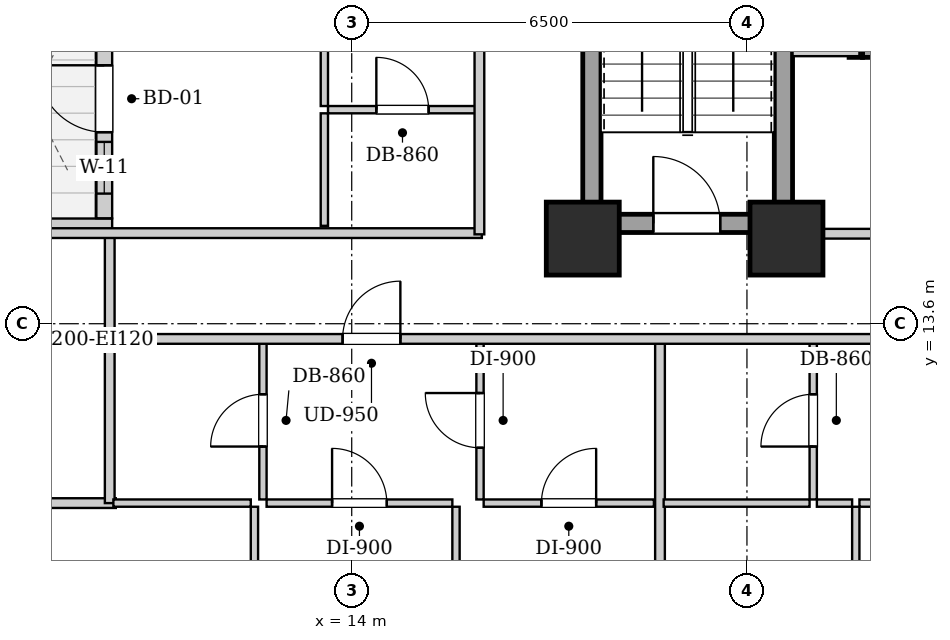
"""IFC4 building model, lengths in metres.
Left out: names, types, materials, properties, quantities, classifications, styles, units other than length and angle.
Written with IfcOpenShell. Run it as: python <this file> out.ifc"""

import sys

from ifc_helpers import new_model, si_unit, direction, frame, frame_2d, origin, origin_2d, place, context, subcontext, project, spatial, rectangle, extrude, element, fill, save


model = new_model("IFC4")
c1 = context("Model", 3, precision=1e-05, world=origin(), true_north=direction((0.0, 1.0)))
c2 = subcontext(c1, "Body", "Model", "MODEL_VIEW")
j1 = project(units=[si_unit("LENGTHUNIT", "METRE"), si_unit("PLANEANGLEUNIT", "RADIAN")], contexts=[c1])
p1 = place(None, origin())
s1 = spatial("IfcSite", under=j1, at=p1, CompositionType="ELEMENT")
p2 = place(p1, origin())
s2 = spatial("IfcBuilding", under=s1, at=p2, CompositionType="ELEMENT")
p3 = place(p2, frame((0.0, 0.0, 41.8)))
s3 = spatial("IfcBuildingStorey", under=s2, at=p3, CompositionType="ELEMENT", Elevation=41.8)
for number, where, z_axis, x_axis in (
    (1, (17.8, 15.0, 0.0), (0.0, 0.0, 1.0), (1.0, 0.0, 0.0)),
    (2, (21.15, 15.0, 0.0), (0.0, 0.0, 1.0), (1.0, 0.0, 0.0)),
):
    element("IfcColumn", number, at=place(p3, frame(where, z_axis=z_axis, x_axis=x_axis)), inside=s3, PredefinedType="COLUMN", context=c2, shape_type="SweptSolid", body=[
        extrude(rectangle(XDim=1.2, YDim=1.2, at=origin_2d()), origin(), (0.0, 0.0, 1.0), 3.2),
    ])
p4 = place(p3, frame((7.66, 15.2, 0.0), z_axis=(0.0, 0.0, 1.0), x_axis=(1.0, 0.0, 0.0)))
e3 = element("IfcWall", 3, at=p4, inside=s3, PredefinedType="SOLIDWALL", context=c2, shape_type="SweptSolid", body=[
    extrude(rectangle(XDim=2.4, YDim=0.26, at=frame_2d((1.2, 0.0))), origin(), (0.0, 0.0, 1.0), 2.94),
])
p5 = place(p3, frame((9.93, 15.334, 0.0), z_axis=(0.0, 0.0, 1.0), x_axis=(0.0, 1.0, 0.0)))
e4 = element("IfcWall", 4, at=p5, inside=s3, PredefinedType="SOLIDWALL", context=c2, shape_type="SweptSolid", body=[
    extrude(rectangle(XDim=3.932, YDim=0.26, at=frame_2d((1.966, 0.0))), origin(), (0.0, 0.0, 1.0), 2.94),
])
p6 = place(p5, frame((1.416, 0.0, 0.0)))
e5 = element("IfcOpeningElement", 5, at=p6, cuts=e4, PredefinedType="OPENING", context=c2, shape_type="SweptSolid", body=[
    extrude(rectangle(XDim=1.1, YDim=2.0, at=frame_2d((0.55, 1.0))), frame((0.0, 0.14, 0.0), z_axis=(0.0, -1.0, 0.0), x_axis=(1.0, 0.0, 0.0)), (0.0, 0.0, 1.0), 0.28),
])
p7 = place(p5, frame((0.406, 0.0, 0.55)))
e6 = element("IfcOpeningElement", 6, at=p7, cuts=e4, PredefinedType="OPENING", context=c2, shape_type="SweptSolid", body=[
    extrude(rectangle(XDim=0.85, YDim=1.2, at=frame_2d((0.425, 0.6))), frame((0.0, 0.14, 0.0), z_axis=(0.0, -1.0, 0.0), x_axis=(1.0, 0.0, 0.0)), (0.0, 0.0, 1.0), 0.28),
])
for number, where, z_axis, x_axis in (
    (7, (17.95, 15.1, 0.0), (0.0, 0.0, 1.0), (0.0, 1.0, 0.0)),
    (8, (21.1, 15.1, 0.0), (0.0, 0.0, 1.0), (0.0, 1.0, 0.0)),
):
    element("IfcWall", number, at=place(p3, frame(where, z_axis=z_axis, x_axis=x_axis)), inside=s3, PredefinedType="SHEAR", context=c2, shape_type="SweptSolid", body=[
        extrude(rectangle(XDim=9.0, YDim=0.3, at=frame_2d((4.5, 0.0))), origin(), (0.0, 0.0, 1.0), 2.94),
    ])
p8 = place(p3, frame((18.1, 15.25, 0.0), z_axis=(0.0, 0.0, 1.0), x_axis=(1.0, 0.0, 0.0)))
e9 = element("IfcWall", 9, at=p8, inside=s3, PredefinedType="SHEAR", context=c2, shape_type="SweptSolid", body=[
    extrude(rectangle(XDim=2.85, YDim=0.3, at=frame_2d((1.425, 0.0))), origin(), (0.0, 0.0, 1.0), 2.94),
])
p9 = place(p8, frame((0.86, 0.0, 0.0)))
e10 = element("IfcOpeningElement", 10, at=p9, cuts=e9, PredefinedType="OPENING", context=c2, shape_type="SweptSolid", body=[
    extrude(rectangle(XDim=1.1, YDim=2.05, at=frame_2d((0.55, 1.025))), frame((0.0, 0.16, 0.0), z_axis=(0.0, -1.0, 0.0), x_axis=(1.0, 0.0, 0.0)), (0.0, 0.0, 1.0), 0.32),
])
p10 = place(p3, frame((22.4, 18.09, 0.0), z_axis=(0.0, 0.0, 1.0), x_axis=(1.0, 0.0, 0.0)))
e11 = element("IfcWall", 11, at=p10, inside=s3, PredefinedType="SHEAR", context=c2, shape_type="SweptSolid", body=[
    extrude(rectangle(XDim=2.4, YDim=0.22, at=frame_2d((1.2, 0.0))), origin(), (0.0, 0.0, 1.0), 2.94),
])
p11 = place(p10, frame((0.6, 0.0, 0.0)))
e12 = element("IfcOpeningElement", 12, at=p11, cuts=e11, PredefinedType="OPENING", context=c2, shape_type="SweptSolid", body=[
    extrude(rectangle(XDim=1.2, YDim=2.15, at=frame_2d((0.6, 1.075))), frame((0.0, 0.12, 0.0), z_axis=(0.0, -1.0, 0.0), x_axis=(1.0, 0.0, 0.0)), (0.0, 0.0, 1.0), 0.24),
])
p12 = place(p3, frame((22.29, 17.98, 0.0), z_axis=(0.0, 0.0, 1.0), x_axis=(0.0, 1.0, 0.0)))
e13 = element("IfcWall", 13, at=p12, inside=s3, PredefinedType="SHEAR", context=c2, shape_type="SweptSolid", body=[
    extrude(rectangle(XDim=2.54, YDim=0.22, at=frame_2d((1.27, 0.0))), origin(), (0.0, 0.0, 1.0), 2.94),
])
p13 = place(p3, frame((21.25, 15.08, 0.0), z_axis=(0.0, 0.0, 1.0), x_axis=(1.0, 0.0, 0.0)))
e14 = element("IfcWall", 14, at=p13, inside=s3, PredefinedType="PARTITIONING", context=c2, shape_type="SweptSolid", body=[
    extrude(rectangle(XDim=8.5, YDim=0.16, at=frame_2d((4.25, 0.0))), origin(), (0.0, 0.0, 1.0), 2.155),
])
p14 = place(p13, frame((3.725, 0.0, 0.0)))
e15 = element("IfcOpeningElement", 15, at=p14, cuts=e14, PredefinedType="OPENING", context=c2, shape_type="SweptSolid", body=[
    extrude(rectangle(XDim=1.05, YDim=2.05, at=frame_2d((0.525, 1.025))), frame((0.0, 0.09, 0.0), z_axis=(0.0, -1.0, 0.0), x_axis=(1.0, 0.0, 0.0)), (0.0, 0.0, 1.0), 0.18),
])
p15 = place(p3, frame((21.25, 18.08, 0.0), z_axis=(0.0, 0.0, 1.0), x_axis=(1.0, 0.0, 0.0)))
e16 = element("IfcWall", 16, at=p15, inside=s3, PredefinedType="PARTITIONING", context=c2, shape_type="SweptSolid", body=[
    extrude(rectangle(XDim=1.1, YDim=0.16, at=frame_2d((0.55, 0.0))), origin(), (0.0, 0.0, 1.0), 2.94),
])
p16 = place(p3, frame((10.02, 13.35, 0.0), z_axis=(0.0, 0.0, 1.0), x_axis=(0.0, 1.0, 0.0)))
e17 = element("IfcWall", 17, at=p16, inside=s3, PredefinedType="PARTITIONING", context=c2, shape_type="SweptSolid", body=[
    extrude(rectangle(XDim=1.74, YDim=0.16, at=frame_2d((0.87, 0.0))), origin(), (0.0, 0.0, 1.0), 2.94),
])
p17 = place(p3, frame((7.78, 15.09, 0.0), z_axis=(0.0, 0.0, 1.0), x_axis=(1.0, 0.0, 0.0)))
e18 = element("IfcWall", 18, at=p17, inside=s3, PredefinedType="PARTITIONING", context=c2, shape_type="SweptSolid", body=[
    extrude(rectangle(XDim=8.36, YDim=0.16, at=frame_2d((4.18, 0.0))), origin(), (0.0, 0.0, 1.0), 2.155),
])
p18 = place(p3, frame((7.78, 10.65, 0.0), z_axis=(0.0, 0.0, 1.0), x_axis=(1.0, 0.0, 0.0)))
e19 = element("IfcWall", 19, at=p18, inside=s3, PredefinedType="PARTITIONING", context=c2, shape_type="SweptSolid", body=[
    extrude(rectangle(XDim=2.34, YDim=0.16, at=frame_2d((1.17, 0.0))), origin(), (0.0, 0.0, 1.0), 2.94),
])
p19 = place(p3, frame((10.02, 10.65, 0.0), z_axis=(0.0, 0.0, 1.0), x_axis=(0.0, 1.0, 0.0)))
e20 = element("IfcWall", 20, at=p19, inside=s3, PredefinedType="PARTITIONING", context=c2, shape_type="SweptSolid", body=[
    extrude(rectangle(XDim=2.66, YDim=0.16, at=frame_2d((1.33, 0.0))), origin(), (0.0, 0.0, 1.0), 2.94),
])
p20 = place(p3, frame((12.54, 10.71, 0.0), z_axis=(0.0, 0.0, 1.0), x_axis=(0.0, 1.0, 0.0)))
e21 = element("IfcWall", 21, at=p20, inside=s3, PredefinedType="PARTITIONING", context=c2, shape_type="SweptSolid", body=[
    extrude(rectangle(XDim=2.6, YDim=0.12, at=frame_2d((1.3, 0.0))), origin(), (0.0, 0.0, 1.0), 2.94),
])
p21 = place(p20, frame((0.87, 0.0, 0.0)))
e22 = element("IfcOpeningElement", 22, at=p21, cuts=e21, PredefinedType="OPENING", context=c2, shape_type="SweptSolid", body=[
    extrude(rectangle(XDim=0.86, YDim=2.05, at=frame_2d((0.43, 1.025))), frame((0.0, 0.07, 0.0), z_axis=(0.0, -1.0, 0.0), x_axis=(1.0, 0.0, 0.0)), (0.0, 0.0, 1.0), 0.14),
])
p22 = place(p3, frame((10.08, 10.65, 0.0), z_axis=(0.0, 0.0, 1.0), x_axis=(1.0, 0.0, 0.0)))
e23 = element("IfcWall", 23, at=p22, inside=s3, PredefinedType="PARTITIONING", context=c2, shape_type="SweptSolid", body=[
    extrude(rectangle(XDim=2.26, YDim=0.12, at=frame_2d((1.13, 0.0))), origin(), (0.0, 0.0, 1.0), 2.94),
])
p23 = place(p3, frame((16.11, 10.71, 0.0), z_axis=(0.0, 0.0, 1.0), x_axis=(0.0, 1.0, 0.0)))
e24 = element("IfcWall", 24, at=p23, inside=s3, PredefinedType="PARTITIONING", context=c2, shape_type="SweptSolid", body=[
    extrude(rectangle(XDim=2.6, YDim=0.12, at=frame_2d((1.3, 0.0))), origin(), (0.0, 0.0, 1.0), 2.94),
])
p24 = place(p23, frame((0.85, 0.0, 0.0)))
e25 = element("IfcOpeningElement", 25, at=p24, cuts=e24, PredefinedType="OPENING", context=c2, shape_type="SweptSolid", body=[
    extrude(rectangle(XDim=0.9, YDim=2.05, at=frame_2d((0.45, 1.025))), frame((0.0, 0.07, 0.0), z_axis=(0.0, -1.0, 0.0), x_axis=(1.0, 0.0, 0.0)), (0.0, 0.0, 1.0), 0.14),
])
p25 = place(p3, frame((12.6, 10.65, 0.0), z_axis=(0.0, 0.0, 1.0), x_axis=(1.0, 0.0, 0.0)))
e26 = element("IfcWall", 26, at=p25, inside=s3, PredefinedType="PARTITIONING", context=c2, shape_type="SweptSolid", body=[
    extrude(rectangle(XDim=3.055, YDim=0.12, at=frame_2d((1.527, 0.0))), origin(), (0.0, 0.0, 1.0), 2.94),
])
p26 = place(p25, frame((1.077, 0.0, 0.0)))
e27 = element("IfcOpeningElement", 27, at=p26, cuts=e26, PredefinedType="OPENING", context=c2, shape_type="SweptSolid", body=[
    extrude(rectangle(XDim=0.9, YDim=2.05, at=frame_2d((0.45, 1.025))), frame((0.0, 0.07, 0.0), z_axis=(0.0, -1.0, 0.0), x_axis=(1.0, 0.0, 0.0)), (0.0, 0.0, 1.0), 0.14),
])
p27 = place(p3, frame((16.17, 10.65, 0.0), z_axis=(0.0, 0.0, 1.0), x_axis=(1.0, 0.0, 0.0)))
e28 = element("IfcWall", 28, at=p27, inside=s3, PredefinedType="PARTITIONING", context=c2, shape_type="SweptSolid", body=[
    extrude(rectangle(XDim=2.8, YDim=0.12, at=frame_2d((1.4, 0.0))), origin(), (0.0, 0.0, 1.0), 2.94),
])
p28 = place(p27, frame((0.95, 0.0, 0.0)))
e29 = element("IfcOpeningElement", 29, at=p28, cuts=e28, PredefinedType="OPENING", context=c2, shape_type="SweptSolid", body=[
    extrude(rectangle(XDim=0.9, YDim=2.05, at=frame_2d((0.45, 1.025))), frame((0.0, 0.07, 0.0), z_axis=(0.0, -1.0, 0.0), x_axis=(1.0, 0.0, 0.0)), (0.0, 0.0, 1.0), 0.14),
])
p29 = place(p3, frame((12.4, 2.43, 0.0), z_axis=(0.0, 0.0, 1.0), x_axis=(0.0, 1.0, 0.0)))
e30 = element("IfcWall", 30, at=p29, inside=s3, PredefinedType="PARTITIONING", context=c2, shape_type="SweptSolid", body=[
    extrude(rectangle(XDim=8.16, YDim=0.12, at=frame_2d((4.08, 0.0))), origin(), (0.0, 0.0, 1.0), 2.94),
])
p30 = place(p29, frame((3.63, 0.0, 0.0)))
e31 = element("IfcOpeningElement", 31, at=p30, cuts=e30, PredefinedType="OPENING", context=c2, shape_type="SweptSolid", body=[
    extrude(rectangle(XDim=0.9, YDim=2.05, at=frame_2d((0.45, 1.025))), frame((0.0, 0.07, 0.0), z_axis=(0.0, -1.0, 0.0), x_axis=(1.0, 0.0, 0.0)), (0.0, 0.0, 1.0), 0.14),
])
p31 = place(p3, frame((15.715, 2.43, 0.0), z_axis=(0.0, 0.0, 1.0), x_axis=(0.0, 1.0, 0.0)))
e32 = element("IfcWall", 32, at=p31, inside=s3, PredefinedType="PARTITIONING", context=c2, shape_type="SweptSolid", body=[
    extrude(rectangle(XDim=8.16, YDim=0.12, at=frame_2d((4.08, 0.0))), origin(), (0.0, 0.0, 1.0), 2.94),
])
p32 = place(p31, frame((3.63, 0.0, 0.0)))
e33 = element("IfcOpeningElement", 33, at=p32, cuts=e32, PredefinedType="OPENING", context=c2, shape_type="SweptSolid", body=[
    extrude(rectangle(XDim=0.9, YDim=2.05, at=frame_2d((0.45, 1.025))), frame((0.0, 0.07, 0.0), z_axis=(0.0, -1.0, 0.0), x_axis=(1.0, 0.0, 0.0)), (0.0, 0.0, 1.0), 0.14),
])
p33 = place(p3, frame((19.07, 0.28, 0.0), z_axis=(0.0, 0.0, 1.0), x_axis=(0.0, 1.0, 0.0)))
e34 = element("IfcWall", 34, at=p33, inside=s3, PredefinedType="PARTITIONING", context=c2, shape_type="SweptSolid", body=[
    extrude(rectangle(XDim=13.03, YDim=0.16, at=frame_2d((6.515, 0.0))), origin(), (0.0, 0.0, 1.0), 2.94),
])
p34 = place(p3, frame((21.59, 10.71, 0.0), z_axis=(0.0, 0.0, 1.0), x_axis=(0.0, 1.0, 0.0)))
e35 = element("IfcWall", 35, at=p34, inside=s3, PredefinedType="PARTITIONING", context=c2, shape_type="SweptSolid", body=[
    extrude(rectangle(XDim=2.6, YDim=0.12, at=frame_2d((1.3, 0.0))), origin(), (0.0, 0.0, 1.0), 2.94),
])
p35 = place(p34, frame((0.87, 0.0, 0.0)))
e36 = element("IfcOpeningElement", 36, at=p35, cuts=e35, PredefinedType="OPENING", context=c2, shape_type="SweptSolid", body=[
    extrude(rectangle(XDim=0.86, YDim=2.05, at=frame_2d((0.43, 1.025))), frame((0.0, 0.07, 0.0), z_axis=(0.0, -1.0, 0.0), x_axis=(1.0, 0.0, 0.0)), (0.0, 0.0, 1.0), 0.14),
])
p36 = place(p3, frame((19.13, 10.65, 0.0), z_axis=(0.0, 0.0, 1.0), x_axis=(1.0, 0.0, 0.0)))
e37 = element("IfcWall", 37, at=p36, inside=s3, PredefinedType="PARTITIONING", context=c2, shape_type="SweptSolid", body=[
    extrude(rectangle(XDim=2.4, YDim=0.12, at=frame_2d((1.2, 0.0))), origin(), (0.0, 0.0, 1.0), 2.94),
])
p37 = place(p3, frame((21.65, 10.65, 0.0), z_axis=(0.0, 0.0, 1.0), x_axis=(1.0, 0.0, 0.0)))
e38 = element("IfcWall", 38, at=p37, inside=s3, PredefinedType="PARTITIONING", context=c2, shape_type="SweptSolid", body=[
    extrude(rectangle(XDim=0.58, YDim=0.12, at=frame_2d((0.29, 0.0))), origin(), (0.0, 0.0, 1.0), 2.94),
])
p38 = place(p3, frame((22.35, 10.65, 0.0), z_axis=(0.0, 0.0, 1.0), x_axis=(1.0, 0.0, 0.0)))
e39 = element("IfcWall", 39, at=p38, inside=s3, PredefinedType="PARTITIONING", context=c2, shape_type="SweptSolid", body=[
    extrude(rectangle(XDim=3.1, YDim=0.12, at=frame_2d((1.55, 0.0))), origin(), (0.0, 0.0, 1.0), 2.94),
])
p39 = place(p38, frame((1.1, 0.0, 0.0)))
e40 = element("IfcOpeningElement", 40, at=p39, cuts=e39, PredefinedType="OPENING", context=c2, shape_type="SweptSolid", body=[
    extrude(rectangle(XDim=0.9, YDim=2.05, at=frame_2d((0.45, 1.025))), frame((0.0, 0.07, 0.0), z_axis=(0.0, -1.0, 0.0), x_axis=(1.0, 0.0, 0.0)), (0.0, 0.0, 1.0), 0.14),
])
p40 = place(p3, frame((22.29, 0.28, 0.0), z_axis=(0.0, 0.0, 1.0), x_axis=(0.0, 1.0, 0.0)))
e41 = element("IfcWall", 41, at=p40, inside=s3, PredefinedType="PARTITIONING", context=c2, shape_type="SweptSolid", body=[
    extrude(rectangle(XDim=10.31, YDim=0.12, at=frame_2d((5.155, 0.0))), origin(), (0.0, 0.0, 1.0), 2.94),
])
p41 = place(p40, frame((4.69, 0.0, 0.0)))
e42 = element("IfcOpeningElement", 42, at=p41, cuts=e41, PredefinedType="OPENING", context=c2, shape_type="SweptSolid", body=[
    extrude(rectangle(XDim=0.9, YDim=2.05, at=frame_2d((0.45, 1.025))), frame((0.0, 0.07, 0.0), z_axis=(0.0, -1.0, 0.0), x_axis=(1.0, 0.0, 0.0)), (0.0, 0.0, 1.0), 0.14),
])
p42 = place(p3, frame((13.61, 17.12, 0.0), z_axis=(0.0, 0.0, 1.0), x_axis=(1.0, 0.0, 0.0)))
e43 = element("IfcWall", 43, at=p42, inside=s3, PredefinedType="PARTITIONING", context=c2, shape_type="SweptSolid", body=[
    extrude(rectangle(XDim=2.45, YDim=0.12, at=frame_2d((1.225, 0.0))), origin(), (0.0, 0.0, 1.0), 2.94),
])
p43 = place(p42, frame((0.795, 0.0, 0.0)))
e44 = element("IfcOpeningElement", 44, at=p43, cuts=e43, PredefinedType="OPENING", context=c2, shape_type="SweptSolid", body=[
    extrude(rectangle(XDim=0.86, YDim=2.05, at=frame_2d((0.43, 1.025))), frame((0.0, 0.07, 0.0), z_axis=(0.0, -1.0, 0.0), x_axis=(1.0, 0.0, 0.0)), (0.0, 0.0, 1.0), 0.14),
])
p44 = place(p3, frame((13.55, 15.21, 0.0), z_axis=(0.0, 0.0, 1.0), x_axis=(0.0, 1.0, 0.0)))
e45 = element("IfcWall", 45, at=p44, inside=s3, PredefinedType="PARTITIONING", context=c2, shape_type="SweptSolid", body=[
    extrude(rectangle(XDim=1.85, YDim=0.12, at=frame_2d((0.925, 0.0))), origin(), (0.0, 0.0, 1.0), 2.94),
])
p45 = place(p3, frame((13.55, 17.18, 0.0), z_axis=(0.0, 0.0, 1.0), x_axis=(0.0, 1.0, 0.0)))
e46 = element("IfcWall", 46, at=p45, inside=s3, PredefinedType="PARTITIONING", context=c2, shape_type="SweptSolid", body=[
    extrude(rectangle(XDim=3.946, YDim=0.12, at=frame_2d((1.973, 0.0))), origin(), (0.0, 0.0, 1.0), 2.94),
])
p46 = place(p45, frame((1.523, 0.0, 0.0)))
e47 = element("IfcOpeningElement", 47, at=p46, cuts=e46, PredefinedType="OPENING", context=c2, shape_type="SweptSolid", body=[
    extrude(rectangle(XDim=0.9, YDim=2.05, at=frame_2d((0.45, 1.025))), frame((0.0, 0.07, 0.0), z_axis=(0.0, -1.0, 0.0), x_axis=(1.0, 0.0, 0.0)), (0.0, 0.0, 1.0), 0.14),
])
p47 = place(p3, frame((10.05, 13.35, 0.0), z_axis=(0.0, 0.0, 1.0), x_axis=(1.0, 0.0, 0.0)))
e48 = element("IfcWall", 48, at=p47, inside=s3, PredefinedType="PARTITIONING", context=c2, shape_type="SweptSolid", body=[
    extrude(rectangle(XDim=33.9, YDim=0.16, at=frame_2d((16.95, 0.0))), origin(), (0.0, 0.0, 1.0), 2.94),
])
p48 = place(p47, frame((3.8, 0.0, 0.0)))
e49 = element("IfcOpeningElement", 49, at=p48, cuts=e48, PredefinedType="OPENING", context=c2, shape_type="SweptSolid", body=[
    extrude(rectangle(XDim=0.95, YDim=2.1, at=frame_2d((0.475, 1.05))), frame((0.0, 0.09, 0.0), z_axis=(0.0, -1.0, 0.0), x_axis=(1.0, 0.0, 0.0)), (0.0, 0.0, 1.0), 0.18),
])
p49 = place(p47, frame((13.345, 0.0, 0.0)))
e50 = element("IfcOpeningElement", 50, at=p49, cuts=e48, PredefinedType="OPENING", context=c2, shape_type="SweptSolid", body=[
    extrude(rectangle(XDim=0.95, YDim=2.1, at=frame_2d((0.475, 1.05))), frame((0.0, 0.09, 0.0), z_axis=(0.0, -1.0, 0.0), x_axis=(1.0, 0.0, 0.0)), (0.0, 0.0, 1.0), 0.18),
])
p50 = place(p3, frame((16.1, 15.07, 0.0), z_axis=(0.0, 0.0, 1.0), x_axis=(0.0, 1.0, 0.0)))
e51 = element("IfcWall", 51, at=p50, inside=s3, PredefinedType="PARTITIONING", context=c2, shape_type="SweptSolid", body=[
    extrude(rectangle(XDim=13.93, YDim=0.16, at=frame_2d((6.965, 0.0))), origin(), (0.0, 0.0, 1.0), 2.94),
])
p51 = place(p50, frame((3.608, 0.0, 0.0)))
e52 = element("IfcOpeningElement", 52, at=p51, cuts=e51, PredefinedType="OPENING", context=c2, shape_type="SweptSolid", body=[
    extrude(rectangle(XDim=0.95, YDim=2.1, at=frame_2d((0.475, 1.05))), frame((0.0, 0.09, 0.0), z_axis=(0.0, -1.0, 0.0), x_axis=(1.0, 0.0, 0.0)), (0.0, 0.0, 1.0), 0.18),
])
p52 = place(p50, frame((10.649, 0.0, 0.0)))
e53 = element("IfcOpeningElement", 53, at=p52, cuts=e51, PredefinedType="OPENING", context=c2, shape_type="SweptSolid", body=[
    extrude(rectangle(XDim=0.95, YDim=2.1, at=frame_2d((0.475, 1.05))), frame((0.0, 0.09, 0.0), z_axis=(0.0, -1.0, 0.0), x_axis=(1.0, 0.0, 0.0)), (0.0, 0.0, 1.0), 0.18),
])
p53 = place(p9, origin())
e54 = element("IfcDoor", 54, at=p53, inside=s3, OperationType="SINGLE_SWING_LEFT", PredefinedType="DOOR", context=c2, shape_type="SweptSolid", body=[
    extrude(rectangle(XDim=1.1, YDim=2.05, at=frame_2d((0.55, 1.025))), frame((0.0, 0.025, 0.0), z_axis=(0.0, -1.0, 0.0), x_axis=(1.0, 0.0, 0.0)), (0.0, 0.0, 1.0), 0.05),
])
fill(e10, e54)
p54 = place(p21, origin())
e55 = element("IfcDoor", 55, at=p54, inside=s3, OperationType="SINGLE_SWING_LEFT", PredefinedType="DOOR", context=c2, shape_type="SweptSolid", body=[
    extrude(rectangle(XDim=0.86, YDim=2.05, at=frame_2d((0.43, 1.025))), frame((0.0, 0.025, 0.0), z_axis=(0.0, -1.0, 0.0), x_axis=(1.0, 0.0, 0.0)), (0.0, 0.0, 1.0), 0.05),
])
fill(e22, e55)
p55 = place(p24, origin())
e56 = element("IfcDoor", 56, at=p55, inside=s3, OperationType="SINGLE_SWING_RIGHT", PredefinedType="DOOR", context=c2, shape_type="SweptSolid", body=[
    extrude(rectangle(XDim=0.9, YDim=2.05, at=frame_2d((0.45, 1.025))), frame((0.0, 0.025, 0.0), z_axis=(0.0, -1.0, 0.0), x_axis=(1.0, 0.0, 0.0)), (0.0, 0.0, 1.0), 0.05),
])
fill(e25, e56)
p56 = place(p26, origin())
e57 = element("IfcDoor", 57, at=p56, inside=s3, OperationType="SINGLE_SWING_LEFT", PredefinedType="DOOR", context=c2, shape_type="SweptSolid", body=[
    extrude(rectangle(XDim=0.9, YDim=2.05, at=frame_2d((0.45, 1.025))), frame((0.0, 0.025, 0.0), z_axis=(0.0, -1.0, 0.0), x_axis=(1.0, 0.0, 0.0)), (0.0, 0.0, 1.0), 0.05),
])
fill(e27, e57)
p57 = place(p28, origin())
e58 = element("IfcDoor", 58, at=p57, inside=s3, OperationType="SINGLE_SWING_RIGHT", PredefinedType="DOOR", context=c2, shape_type="SweptSolid", body=[
    extrude(rectangle(XDim=0.9, YDim=2.05, at=frame_2d((0.45, 1.025))), frame((0.0, 0.025, 0.0), z_axis=(0.0, -1.0, 0.0), x_axis=(1.0, 0.0, 0.0)), (0.0, 0.0, 1.0), 0.05),
])
fill(e29, e58)
p58 = place(p35, origin())
e59 = element("IfcDoor", 59, at=p58, inside=s3, OperationType="SINGLE_SWING_LEFT", PredefinedType="DOOR", context=c2, shape_type="SweptSolid", body=[
    extrude(rectangle(XDim=0.86, YDim=2.05, at=frame_2d((0.43, 1.025))), frame((0.0, 0.025, 0.0), z_axis=(0.0, -1.0, 0.0), x_axis=(1.0, 0.0, 0.0)), (0.0, 0.0, 1.0), 0.05),
])
fill(e36, e59)
p59 = place(p43, origin())
e60 = element("IfcDoor", 60, at=p59, inside=s3, OperationType="SINGLE_SWING_LEFT", PredefinedType="DOOR", context=c2, shape_type="SweptSolid", body=[
    extrude(rectangle(XDim=0.86, YDim=2.05, at=frame_2d((0.43, 1.025))), frame((0.0, 0.025, 0.0), z_axis=(0.0, -1.0, 0.0), x_axis=(1.0, 0.0, 0.0)), (0.0, 0.0, 1.0), 0.05),
])
fill(e44, e60)
p60 = place(p48, origin())
e61 = element("IfcDoor", 61, at=p60, inside=s3, OperationType="SINGLE_SWING_RIGHT", PredefinedType="DOOR", context=c2, shape_type="SweptSolid", body=[
    extrude(rectangle(XDim=0.95, YDim=2.1, at=frame_2d((0.475, 1.05))), frame((0.0, 0.025, 0.0), z_axis=(0.0, -1.0, 0.0), x_axis=(1.0, 0.0, 0.0)), (0.0, 0.0, 1.0), 0.05),
])
fill(e49, e61)
p61 = place(p6, origin())
e62 = element("IfcDoor", 62, at=p61, inside=s3, OperationType="SINGLE_SWING_RIGHT", PredefinedType="DOOR", context=c2, shape_type="SweptSolid", body=[
    extrude(rectangle(XDim=1.1, YDim=2.0, at=frame_2d((0.55, 1.0))), frame((0.0, 0.025, 0.0), z_axis=(0.0, -1.0, 0.0), x_axis=(1.0, 0.0, 0.0)), (0.0, 0.0, 1.0), 0.05),
])
fill(e5, e62)
p62 = place(p7, origin())
e63 = element("IfcWindow", 63, at=p62, inside=s3, PartitioningType="SINGLE_PANEL", PredefinedType="WINDOW", context=c2, shape_type="SweptSolid", body=[
    extrude(rectangle(XDim=0.85, YDim=1.2, at=frame_2d((0.425, 0.6))), frame((0.0, 0.03, 0.0), z_axis=(0.0, -1.0, 0.0), x_axis=(1.0, 0.0, 0.0)), (0.0, 0.0, 1.0), 0.06),
])
fill(e6, e63)
save(model, sys.argv[1])
